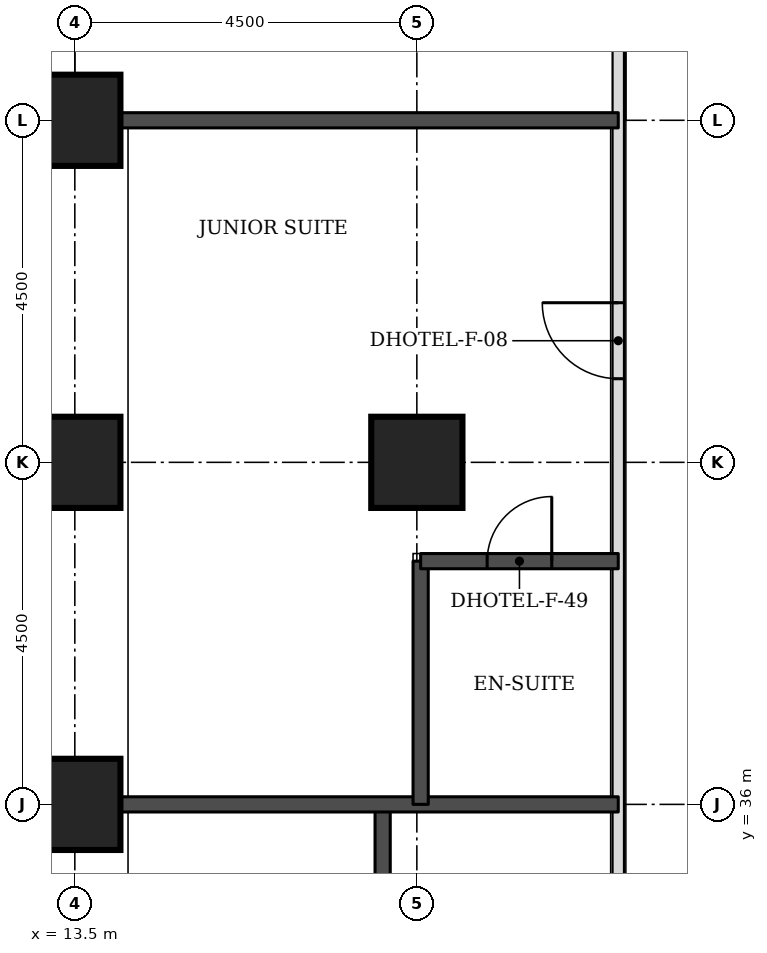
"""IFC4 building model, lengths in metres.
Left out: names, types, materials, properties, quantities, classifications, styles, units other than length and angle.
Written with IfcOpenShell. Run it as: python <this file> out.ifc"""

import sys

from ifc_helpers import new_model, si_unit, direction, frame, frame_2d, origin, origin_2d, place, context, subcontext, project, spatial, rectangle, extrude, element, fill, save


model = new_model("IFC4")
c1 = context("Model", 3, precision=1e-05, world=origin(), true_north=direction((0.0, 1.0)))
c2 = subcontext(c1, "Body", "Model", "MODEL_VIEW")
j1 = project(units=[si_unit("LENGTHUNIT", "METRE"), si_unit("PLANEANGLEUNIT", "RADIAN")], contexts=[c1])
p1 = place(None, origin())
s1 = spatial("IfcSite", under=j1, at=p1, CompositionType="ELEMENT")
p2 = place(p1, origin())
s2 = spatial("IfcBuilding", under=s1, at=p2, CompositionType="ELEMENT")
p3 = place(p2, frame((0.0, 0.0, 42.9)))
s3 = spatial("IfcBuildingStorey", under=s2, at=p3, CompositionType="ELEMENT", Elevation=42.9)
for number, where, z_axis, x_axis in (
    (1, (13.5, 36.0, 0.0), (0.0, 0.0, 1.0), (1.0, 0.0, 0.0)),
    (2, (13.5, 40.5, 0.0), (0.0, 0.0, 1.0), (1.0, 0.0, 0.0)),
    (3, (18.0, 40.5, 0.0), (0.0, 0.0, 1.0), (1.0, 0.0, 0.0)),
    (4, (13.5, 45.0, 0.0), (0.0, 0.0, 1.0), (1.0, 0.0, 0.0)),
):
    element("IfcColumn", number, at=place(p3, frame(where, z_axis=z_axis, x_axis=x_axis)), inside=s3, PredefinedType="COLUMN", context=c2, shape_type="SweptSolid", body=[
        extrude(rectangle(XDim=1.2, YDim=1.2, at=origin_2d()), origin(), (0.0, 0.0, 1.0), 3.3),
    ])
p4 = place(p3, frame((20.65, 23.65, 0.0), z_axis=(0.0, 0.0, 1.0), x_axis=(0.0, 1.0, 0.0)))
e5 = element("IfcWall", 5, at=p4, inside=s3, PredefinedType="PARTITIONING", context=c2, shape_type="SweptSolid", body=[
    extrude(rectangle(XDim=25.85, YDim=0.15, at=frame_2d((12.925, 0.0))), origin(), (0.0, 0.0, 1.0), 3.08),
])
p5 = place(p4, frame((1.9, 0.0, 0.0)))
e6 = element("IfcOpeningElement", 6, at=p5, cuts=e5, PredefinedType="OPENING", context=c2, shape_type="SweptSolid", body=[
    extrude(rectangle(XDim=1.0, YDim=2.1, at=frame_2d((0.5, 1.05))), frame((0.0, 0.085, 0.0), z_axis=(0.0, -1.0, 0.0), x_axis=(1.0, 0.0, 0.0)), (0.0, 0.0, 1.0), 0.17),
])
p6 = place(p4, frame((6.0, 0.0, 0.0)))
e7 = element("IfcOpeningElement", 7, at=p6, cuts=e5, PredefinedType="OPENING", context=c2, shape_type="SweptSolid", body=[
    extrude(rectangle(XDim=1.0, YDim=2.1, at=frame_2d((0.5, 1.05))), frame((0.0, 0.085, 0.0), z_axis=(0.0, -1.0, 0.0), x_axis=(1.0, 0.0, 0.0)), (0.0, 0.0, 1.0), 0.17),
])
p7 = place(p4, frame((17.95, 0.0, 0.0)))
e8 = element("IfcOpeningElement", 8, at=p7, cuts=e5, PredefinedType="OPENING", context=c2, shape_type="SweptSolid", body=[
    extrude(rectangle(XDim=1.0, YDim=2.1, at=frame_2d((0.5, 1.05))), frame((0.0, 0.085, 0.0), z_axis=(0.0, -1.0, 0.0), x_axis=(1.0, 0.0, 0.0)), (0.0, 0.0, 1.0), 0.17),
])
p8 = place(p4, frame((23.04, 0.0, 0.0)))
e9 = element("IfcOpeningElement", 9, at=p8, cuts=e5, PredefinedType="OPENING", context=c2, shape_type="SweptSolid", body=[
    extrude(rectangle(XDim=0.9, YDim=2.1, at=frame_2d((0.45, 1.05))), frame((0.0, 0.085, 0.0), z_axis=(0.0, -1.0, 0.0), x_axis=(1.0, 0.0, 0.0)), (0.0, 0.0, 1.0), 0.17),
])
p9 = place(p3, frame((17.55, 33.3, 0.0), z_axis=(0.0, 0.0, 1.0), x_axis=(0.0, 1.0, 0.0)))
e10 = element("IfcWall", 10, at=p9, inside=s3, PredefinedType="SOLIDWALL", context=c2, shape_type="SweptSolid", body=[
    extrude(rectangle(XDim=2.7, YDim=0.2, at=frame_2d((1.35, 0.0))), origin(), (0.0, 0.0, 1.0), 3.08),
])
p10 = place(p3, frame((14.1, 36.0, 0.0), z_axis=(0.0, 0.0, 1.0), x_axis=(1.0, 0.0, 0.0)))
e11 = element("IfcWall", 11, at=p10, inside=s3, PredefinedType="SOLIDWALL", context=c2, shape_type="SweptSolid", body=[
    extrude(rectangle(XDim=6.55, YDim=0.2, at=frame_2d((3.275, 0.0))), origin(), (0.0, 0.0, 1.0), 3.08),
])
p11 = place(p3, frame((18.05, 36.0, 0.0), z_axis=(0.0, 0.0, 1.0), x_axis=(0.0, 1.0, 0.0)))
e12 = element("IfcWall", 12, at=p11, inside=s3, PredefinedType="SOLIDWALL", context=c2, shape_type="SweptSolid", body=[
    extrude(rectangle(XDim=3.2, YDim=0.2, at=frame_2d((1.6, 0.0))), origin(), (0.0, 0.0, 1.0), 3.08),
])
p12 = place(p3, frame((18.05, 39.2, 0.0), z_axis=(0.0, 0.0, 1.0), x_axis=(1.0, 0.0, 0.0)))
e13 = element("IfcWall", 13, at=p12, inside=s3, PredefinedType="SOLIDWALL", context=c2, shape_type="SweptSolid", body=[
    extrude(rectangle(XDim=2.6, YDim=0.2, at=frame_2d((1.3, 0.0))), origin(), (0.0, 0.0, 1.0), 3.08),
])
p13 = place(p12, frame((0.875, 0.0, 0.0)))
e14 = element("IfcOpeningElement", 14, at=p13, cuts=e13, PredefinedType="OPENING", context=c2, shape_type="SweptSolid", body=[
    extrude(rectangle(XDim=0.85, YDim=2.1, at=frame_2d((0.425, 1.05))), frame((0.0, 0.11, 0.0), z_axis=(0.0, -1.0, 0.0), x_axis=(1.0, 0.0, 0.0)), (0.0, 0.0, 1.0), 0.22),
])
p14 = place(p3, frame((14.1, 45.0, 0.0), z_axis=(0.0, 0.0, 1.0), x_axis=(1.0, 0.0, 0.0)))
e15 = element("IfcWall", 15, at=p14, inside=s3, PredefinedType="SOLIDWALL", context=c2, shape_type="SweptSolid", body=[
    extrude(rectangle(XDim=6.55, YDim=0.2, at=frame_2d((3.275, 0.0))), origin(), (0.0, 0.0, 1.0), 3.08),
])
p15 = place(p7, origin())
e16 = element("IfcDoor", 16, at=p15, inside=s3, OperationType="SINGLE_SWING_RIGHT", PredefinedType="DOOR", context=c2, shape_type="SweptSolid", body=[
    extrude(rectangle(XDim=1.0, YDim=2.1, at=frame_2d((0.5, 1.05))), frame((0.0, 0.025, 0.0), z_axis=(0.0, -1.0, 0.0), x_axis=(1.0, 0.0, 0.0)), (0.0, 0.0, 1.0), 0.05),
])
fill(e8, e16)
p16 = place(p13, origin())
e17 = element("IfcDoor", 17, at=p16, inside=s3, OperationType="SINGLE_SWING_RIGHT", PredefinedType="DOOR", context=c2, shape_type="SweptSolid", body=[
    extrude(rectangle(XDim=0.85, YDim=2.1, at=frame_2d((0.425, 1.05))), frame((0.0, 0.025, 0.0), z_axis=(0.0, -1.0, 0.0), x_axis=(1.0, 0.0, 0.0)), (0.0, 0.0, 1.0), 0.05),
])
fill(e14, e17)
save(model, sys.argv[1])
